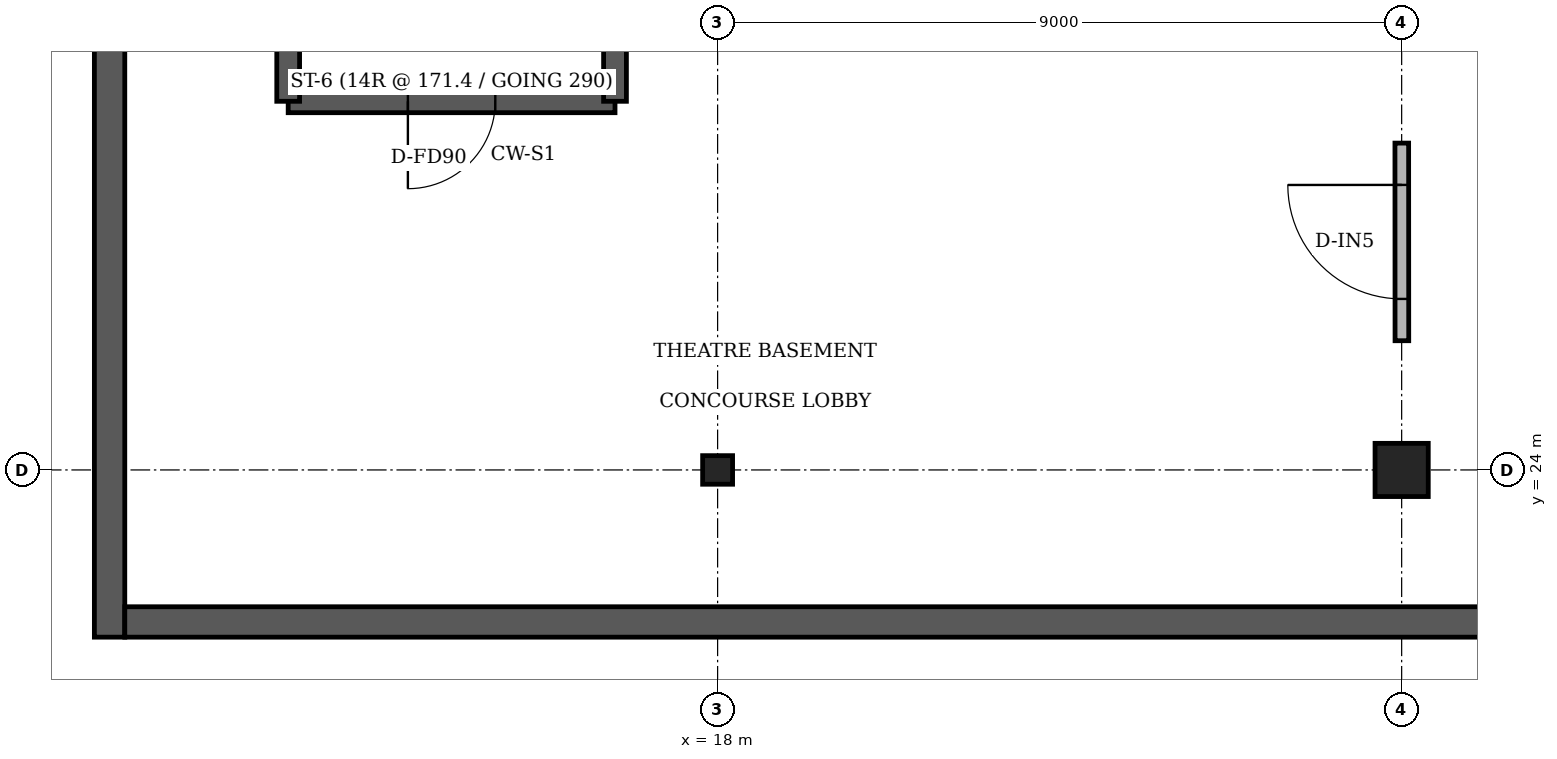
"""IFC4 building model, lengths in metres.
Left out: names, types, materials, properties, quantities, classifications, styles, units other than length and angle.
Written with IfcOpenShell. Run it as: python <this file> out.ifc"""

import sys

from ifc_helpers import new_model, si_unit, direction, frame, frame_2d, origin, origin_2d, place, context, subcontext, project, spatial, rectangle, i_section, extrude, element, fill, save


model = new_model("IFC4")
c1 = context("Model", 3, precision=1e-05, world=origin(), true_north=direction((0.0, 1.0)))
c2 = subcontext(c1, "Body", "Model", "MODEL_VIEW")
j1 = project(units=[si_unit("LENGTHUNIT", "METRE"), si_unit("PLANEANGLEUNIT", "RADIAN")], contexts=[c1])
p1 = place(None, origin())
s1 = spatial("IfcSite", under=j1, at=p1, CompositionType="ELEMENT")
p2 = place(p1, origin())
s2 = spatial("IfcBuilding", under=s1, at=p2, CompositionType="ELEMENT")
p3 = place(p2, frame((0.0, 0.0, -4.8)))
s3 = spatial("IfcBuildingStorey", under=s2, at=p3, CompositionType="ELEMENT", Elevation=-4.8)
p4 = place(p3, frame((18.0, 24.0, -0.35), z_axis=(0.0, 0.0, 1.0), x_axis=(1.0, 0.0, 0.0)))
e1 = element("IfcColumn", 1, at=p4, inside=s3, PredefinedType="COLUMN", context=c2, shape_type="SweptSolid", body=[
    extrude(i_section(OverallWidth=0.394, OverallDepth=0.376, WebThickness=0.017, FlangeThickness=0.028, FilletRadius=0.015, at=origin_2d()), origin(), (0.0, 0.0, 1.0), 5.15),
])
p5 = place(p3, frame((27.0, 24.0, -0.35), z_axis=(0.0, 0.0, 1.0), x_axis=(1.0, 0.0, 0.0)))
e2 = element("IfcColumn", 2, at=p5, inside=s3, PredefinedType="COLUMN", context=c2, shape_type="SweptSolid", body=[
    extrude(rectangle(XDim=0.7, YDim=0.7, at=origin_2d()), origin(), (0.0, 0.0, 1.0), 5.15),
])
p6 = place(p3, frame((10.0, 21.8, -0.35), z_axis=(0.0, 0.0, 1.0), x_axis=(0.0, 1.0, 0.0)))
e3 = element("IfcWall", 3, at=p6, inside=s3, PredefinedType="USERDEFINED", context=c2, shape_type="SweptSolid", body=[
    extrude(rectangle(XDim=17.0, YDim=0.4, at=frame_2d((8.5, 0.0))), origin(), (0.0, 0.0, 1.0), 3.9),
])
p7 = place(p3, frame((54.155, 22.0, -0.35), z_axis=(0.0, 0.0, 1.0), x_axis=(-0.999999999985, 5.554383e-06, 0.0)))
e4 = element("IfcWall", 4, at=p7, inside=s3, PredefinedType="USERDEFINED", context=c2, shape_type="SweptSolid", body=[
    extrude(rectangle(XDim=43.955, YDim=0.4, at=frame_2d((21.977, 0.0))), origin(), (0.0, 0.0, 1.0), 3.9),
])
p8 = place(p3, frame((16.65, 28.85, -0.35), z_axis=(0.0, 0.0, 1.0), x_axis=(-1.0, 0.0, 0.0)))
e5 = element("IfcWall", 5, at=p8, inside=s3, PredefinedType="SOLIDWALL", context=c2, shape_type="SweptSolid", body=[
    extrude(rectangle(XDim=4.3, YDim=0.3, at=frame_2d((2.15, 0.0))), origin(), (0.0, 0.0, 1.0), 5.15),
])
p9 = place(p8, frame((1.575, 0.0, 0.35)))
e6 = element("IfcOpeningElement", 6, at=p9, cuts=e5, PredefinedType="OPENING", context=c2, shape_type="SweptSolid", body=[
    extrude(rectangle(XDim=1.15, YDim=2.2, at=frame_2d((0.575, 1.1))), frame((0.0, 0.16, 0.0), z_axis=(0.0, -1.0, 0.0), x_axis=(1.0, 0.0, 0.0)), (0.0, 0.0, 1.0), 0.32),
])
for number, where, z_axis, x_axis in (
    (7, (16.65, 28.85, -0.35), (0.0, 0.0, 1.0), (0.0, 1.0, 0.0)),
    (8, (12.35, 28.85, -0.35), (0.0, 0.0, 1.0), (0.0, 1.0, 0.0)),
):
    element("IfcWall", number, at=place(p3, frame(where, z_axis=z_axis, x_axis=x_axis)), inside=s3, PredefinedType="SOLIDWALL", context=c2, shape_type="SweptSolid", body=[
        extrude(rectangle(XDim=8.4, YDim=0.3, at=frame_2d((4.2, 0.0))), origin(), (0.0, 0.0, 1.0), 5.15),
    ])
p10 = place(p3, frame((27.003, 25.7, 0.0), z_axis=(0.0, 0.0, 1.0), x_axis=(-0.000563380192, 0.999999841301, 0.0)))
e9 = element("IfcWall", 9, at=p10, inside=s3, PredefinedType="PARTITIONING", context=c2, shape_type="SweptSolid", body=[
    extrude(rectangle(XDim=2.6, YDim=0.18, at=frame_2d((1.3, 0.0))), origin(), (0.0, 0.0, 1.0), 3.15),
])
p11 = place(p10, frame((0.55, 0.0, 0.0)))
e10 = element("IfcOpeningElement", 10, at=p11, cuts=e9, PredefinedType="OPENING", context=c2, shape_type="SweptSolid", body=[
    extrude(rectangle(XDim=1.5, YDim=2.2, at=frame_2d((0.75, 1.1))), frame((0.0, 0.1, 0.0), z_axis=(0.0, -1.0, 0.0), x_axis=(1.0, 0.0, 0.0)), (0.0, 0.0, 1.0), 0.2),
])
p12 = place(p9, origin())
e11 = element("IfcDoor", 11, at=p12, inside=s3, OperationType="SINGLE_SWING_RIGHT", PredefinedType="DOOR", context=c2, shape_type="SweptSolid", body=[
    extrude(rectangle(XDim=1.15, YDim=2.2, at=frame_2d((0.575, 1.1))), frame((0.0, 0.025, 0.0), z_axis=(0.0, -1.0, 0.0), x_axis=(1.0, 0.0, 0.0)), (0.0, 0.0, 1.0), 0.05),
])
fill(e6, e11)
p13 = place(p11, origin())
e12 = element("IfcDoor", 12, at=p13, inside=s3, OperationType="SINGLE_SWING_RIGHT", PredefinedType="DOOR", context=c2, shape_type="SweptSolid", body=[
    extrude(rectangle(XDim=1.5, YDim=2.2, at=frame_2d((0.75, 1.1))), frame((0.0, 0.025, 0.0), z_axis=(0.0, -1.0, 0.0), x_axis=(1.0, 0.0, 0.0)), (0.0, 0.0, 1.0), 0.05),
])
fill(e10, e12)
save(model, sys.argv[1])
